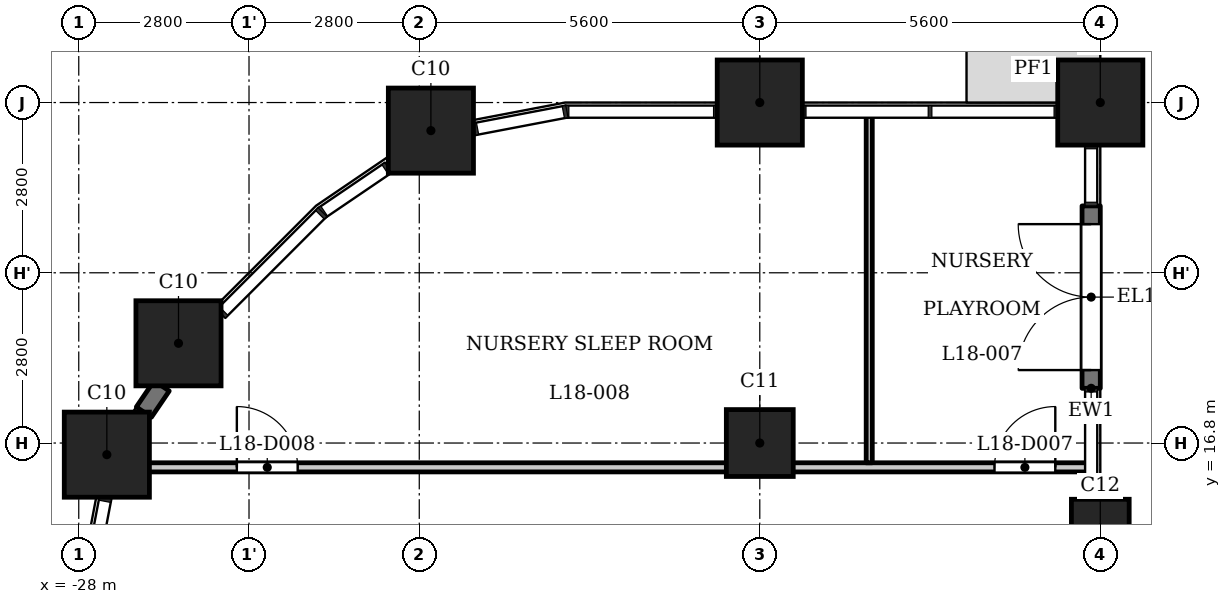
"""IFC4 building model, lengths in metres.
Left out: names, types, materials, properties, quantities, classifications, styles, units other than length and angle.
Written with IfcOpenShell. Run it as: python <this file> out.ifc"""

import sys

from ifc_helpers import new_model, si_unit, direction, frame, frame_2d, origin, origin_2d, place, context, subcontext, project, spatial, rectangle, extrude, element, fill, save


model = new_model("IFC4")
c1 = context("Model", 3, precision=1e-05, world=origin(), true_north=direction((0.0, 1.0)))
c2 = subcontext(c1, "Body", "Model", "MODEL_VIEW")
j1 = project(units=[si_unit("LENGTHUNIT", "METRE"), si_unit("PLANEANGLEUNIT", "RADIAN")], contexts=[c1])
p1 = place(None, origin())
s1 = spatial("IfcSite", under=j1, at=p1, CompositionType="ELEMENT")
p2 = place(p1, origin())
s2 = spatial("IfcBuilding", under=s1, at=p2, CompositionType="ELEMENT")
p3 = place(p2, frame((0.0, 0.0, 72.5)))
s3 = spatial("IfcBuildingStorey", under=s2, at=p3, CompositionType="ELEMENT", Elevation=72.5)
for number, where, z_axis, x_axis in (
    (1, (-11.2, 22.4, 0.0), (0.0, 0.0, 1.0), (1.0, 0.0, 0.0)),
    (2, (-16.8, 22.4, 0.0), (0.0, 0.0, 1.0), (1.0, 0.0, 0.0)),
    (3, (-22.209, 21.938, 0.0), (0.0, 0.0, 1.0), (1.0, 0.0, 0.0)),
    (4, (-26.36, 18.44, 0.0), (0.0, 0.0, 1.0), (1.0, 0.0, 0.0)),
    (5, (-27.538, 16.609, 0.0), (0.0, 0.0, 1.0), (1.0, 0.0, 0.0)),
):
    element("IfcColumn", number, at=place(p3, frame(where, z_axis=z_axis, x_axis=x_axis)), inside=s3, PredefinedType="COLUMN", context=c2, shape_type="SweptSolid", body=[
        extrude(rectangle(XDim=1.4, YDim=1.4, at=origin_2d()), origin(), (0.0, 0.0, 1.0), 5.4),
    ])
p4 = place(p3, frame((-16.8, 16.8, 0.0), z_axis=(0.0, 0.0, 1.0), x_axis=(1.0, 0.0, 0.0)))
e6 = element("IfcColumn", 6, at=p4, inside=s3, PredefinedType="COLUMN", context=c2, shape_type="SweptSolid", body=[
    extrude(rectangle(XDim=1.1, YDim=1.1, at=origin_2d()), origin(), (0.0, 0.0, 1.0), 5.4),
])
p5 = place(p3, frame((-11.2, 15.4, 0.0), z_axis=(0.0, 0.0, 1.0), x_axis=(1.0, 0.0, 0.0)))
e7 = element("IfcColumn", 7, at=p5, inside=s3, PredefinedType="COLUMN", context=c2, shape_type="SweptSolid", body=[
    extrude(rectangle(XDim=0.95, YDim=0.95, at=origin_2d()), origin(), (0.0, 0.0, 1.0), 5.4),
])
p6 = place(p3, frame((-11.35, 17.7, 0.0), z_axis=(0.0, 0.0, 1.0), x_axis=(0.0, 1.0, 0.0)))
e8 = element("IfcWall", 8, at=p6, inside=s3, PredefinedType="SOLIDWALL", context=c2, shape_type="SweptSolid", body=[
    extrude(rectangle(XDim=3.0, YDim=0.3, at=frame_2d((1.5, 0.0))), origin(), (0.0, 0.0, 1.0), 4.95),
])
p7 = place(p6, frame((0.3, 0.0, 0.0)))
e9 = element("IfcOpeningElement", 9, at=p7, cuts=e8, PredefinedType="OPENING", context=c2, shape_type="SweptSolid", body=[
    extrude(rectangle(XDim=2.4, YDim=2.3, at=frame_2d((1.2, 1.15))), frame((0.0, 0.16, 0.0), z_axis=(0.0, -1.0, 0.0), x_axis=(1.0, 0.0, 0.0)), (0.0, 0.0, 1.0), 0.32),
])
p8 = place(p3, frame((-26.636, 17.74, 0.0), z_axis=(0.0, 0.0, 1.0), x_axis=(-0.561913238827, -0.827196175059, 0.0)))
e10 = element("IfcWall", 10, at=p8, inside=s3, PredefinedType="SOLIDWALL", context=c2, shape_type="SweptSolid", body=[
    extrude(rectangle(XDim=0.522, YDim=0.3, at=frame_2d((0.261, 0.0))), origin(), (0.0, 0.0, 1.0), 4.95),
])
p9 = place(p3, frame((-27.52, 16.4, 0.0), z_axis=(0.0, 0.0, 1.0), x_axis=(1.0, 0.0, 0.0)))
e11 = element("IfcWall", 11, at=p9, inside=s3, PredefinedType="PARTITIONING", context=c2, shape_type="SweptSolid", body=[
    extrude(rectangle(XDim=16.136, YDim=0.15, at=frame_2d((8.068, 0.0))), origin(), (0.0, 0.0, 1.0), 4.95),
])
p10 = place(p9, frame((14.58, 0.0, 0.0)))
e12 = element("IfcOpeningElement", 12, at=p10, cuts=e11, PredefinedType="OPENING", context=c2, shape_type="SweptSolid", body=[
    extrude(rectangle(XDim=1.0, YDim=2.1, at=frame_2d((0.5, 1.05))), frame((0.0, 0.085, 0.0), z_axis=(0.0, -1.0, 0.0), x_axis=(1.0, 0.0, 0.0)), (0.0, 0.0, 1.0), 0.17),
])
p11 = place(p9, frame((2.12, 0.0, 0.0)))
e13 = element("IfcOpeningElement", 13, at=p11, cuts=e11, PredefinedType="OPENING", context=c2, shape_type="SweptSolid", body=[
    extrude(rectangle(XDim=1.0, YDim=2.1, at=frame_2d((0.5, 1.05))), frame((0.0, 0.085, 0.0), z_axis=(0.0, -1.0, 0.0), x_axis=(1.0, 0.0, 0.0)), (0.0, 0.0, 1.0), 0.17),
])
p12 = place(p3, frame((-15.0, 16.475, 0.0), z_axis=(0.0, 0.0, 1.0), x_axis=(0.0, 1.0, 0.0)))
e14 = element("IfcWall", 14, at=p12, inside=s3, PredefinedType="PARTITIONING", context=c2, shape_type="SweptSolid", body=[
    extrude(rectangle(XDim=5.741, YDim=0.1, at=frame_2d((2.871, 0.0))), origin(), (0.0, 0.0, 1.0), 4.95),
])
p13 = place(p7, origin())
e15 = element("IfcDoor", 15, at=p13, inside=s3, OperationType="SINGLE_SWING_LEFT", PredefinedType="DOOR", context=c2, shape_type="SweptSolid", body=[
    extrude(rectangle(XDim=2.4, YDim=2.3, at=frame_2d((1.2, 1.15))), frame((0.0, 0.025, 0.0), z_axis=(0.0, -1.0, 0.0), x_axis=(1.0, 0.0, 0.0)), (0.0, 0.0, 1.0), 0.05),
])
fill(e9, e15)
p14 = place(p10, origin())
e16 = element("IfcDoor", 16, at=p14, inside=s3, OperationType="SINGLE_SWING_LEFT", PredefinedType="DOOR", context=c2, shape_type="SweptSolid", body=[
    extrude(rectangle(XDim=1.0, YDim=2.1, at=frame_2d((0.5, 1.05))), frame((0.0, 0.025, 0.0), z_axis=(0.0, -1.0, 0.0), x_axis=(1.0, 0.0, 0.0)), (0.0, 0.0, 1.0), 0.05),
])
fill(e12, e16)
p15 = place(p11, origin())
e17 = element("IfcDoor", 17, at=p15, inside=s3, OperationType="SINGLE_SWING_RIGHT", PredefinedType="DOOR", context=c2, shape_type="SweptSolid", body=[
    extrude(rectangle(XDim=1.0, YDim=2.1, at=frame_2d((0.5, 1.05))), frame((0.0, 0.025, 0.0), z_axis=(0.0, -1.0, 0.0), x_axis=(1.0, 0.0, 0.0)), (0.0, 0.0, 1.0), 0.05),
])
fill(e13, e17)
save(model, sys.argv[1])
